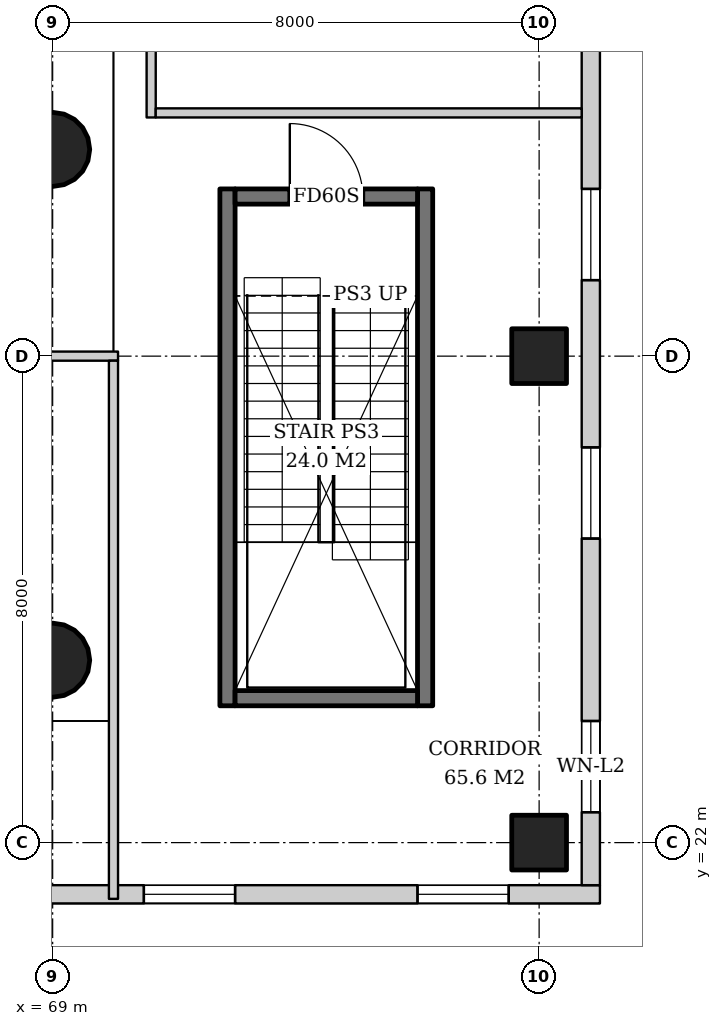
"""IFC4 building model, lengths in metres.
Left out: names, types, materials, properties, quantities, classifications, styles, units other than length and angle.
Written with IfcOpenShell. Run it as: python <this file> out.ifc"""

import sys

from ifc_helpers import new_model, si_unit, direction, frame, frame_2d, origin, origin_2d, place, context, subcontext, project, spatial, rectangle, hollow_circle, extrude, element, fill, save


model = new_model("IFC4")
c1 = context("Model", 3, precision=1e-05, world=origin(), true_north=direction((0.0, 1.0)))
c2 = subcontext(c1, "Body", "Model", "MODEL_VIEW")
j1 = project(units=[si_unit("LENGTHUNIT", "METRE"), si_unit("PLANEANGLEUNIT", "RADIAN")], contexts=[c1])
p1 = place(None, origin())
s1 = spatial("IfcSite", under=j1, at=p1, CompositionType="ELEMENT")
p2 = place(p1, origin())
s2 = spatial("IfcBuilding", under=s1, at=p2, CompositionType="ELEMENT")
p3 = place(p2, frame((0.0, 0.0, 16.0)))
s3 = spatial("IfcBuildingStorey", under=s2, at=p3, CompositionType="ELEMENT", Elevation=16.0)
for number, where, z_axis, x_axis in (
    (1, (77.0, 22.0, 0.0), (0.0, 0.0, 1.0), (1.0, 0.0, 0.0)),
    (2, (77.0, 30.0, 0.0), (0.0, 0.0, 1.0), (1.0, 0.0, 0.0)),
):
    element("IfcColumn", number, at=place(p3, frame(where, z_axis=z_axis, x_axis=x_axis)), inside=s3, PredefinedType="COLUMN", context=c2, shape_type="SweptSolid", body=[
        extrude(rectangle(XDim=0.9, YDim=0.9, at=origin_2d()), origin(), (0.0, 0.0, 1.0), 5.0),
    ])
for number, where, z_axis, x_axis in (
    (3, (69.0, 25.0, 0.0), (0.0, 0.0, 1.0), (1.0, 0.0, 0.0)),
    (4, (69.0, 33.4, 0.0), (0.0, 0.0, 1.0), (1.0, 0.0, 0.0)),
):
    element("IfcColumn", number, at=place(p3, frame(where, z_axis=z_axis, x_axis=x_axis)), inside=s3, PredefinedType="COLUMN", context=c2, shape_type="SweptSolid", body=[
        extrude(hollow_circle(Radius=0.61, WallThickness=0.04, at=origin_2d()), origin(), (0.0, 0.0, 1.0), 5.0),
    ])
p4 = place(p3, frame((20.0, 21.15, 0.0), z_axis=(0.0, 0.0, 1.0), x_axis=(1.0, 0.0, 0.0)))
e5 = element("IfcWall", 5, at=p4, inside=s3, PredefinedType="SOLIDWALL", context=c2, shape_type="SweptSolid", body=[
    extrude(rectangle(XDim=58.0, YDim=0.3, at=frame_2d((29.0, 0.0))), origin(), (0.0, 0.0, 1.0), 4.7),
])
p5 = place(p4, frame((1.5, 0.0, 0.9)))
e6 = element("IfcOpeningElement", 6, at=p5, cuts=e5, PredefinedType="OPENING", context=c2, shape_type="SweptSolid", body=[
    extrude(rectangle(XDim=1.5, YDim=3.2, at=frame_2d((0.75, 1.6))), frame((0.0, 0.16, 0.0), z_axis=(0.0, -1.0, 0.0), x_axis=(1.0, 0.0, 0.0)), (0.0, 0.0, 1.0), 0.32),
])
p6 = place(p4, frame((6.0, 0.0, 0.9)))
e7 = element("IfcOpeningElement", 7, at=p6, cuts=e5, PredefinedType="OPENING", context=c2, shape_type="SweptSolid", body=[
    extrude(rectangle(XDim=1.5, YDim=3.2, at=frame_2d((0.75, 1.6))), frame((0.0, 0.16, 0.0), z_axis=(0.0, -1.0, 0.0), x_axis=(1.0, 0.0, 0.0)), (0.0, 0.0, 1.0), 0.32),
])
p7 = place(p4, frame((10.25, 0.0, 0.9)))
e8 = element("IfcOpeningElement", 8, at=p7, cuts=e5, PredefinedType="OPENING", context=c2, shape_type="SweptSolid", body=[
    extrude(rectangle(XDim=1.5, YDim=3.2, at=frame_2d((0.75, 1.6))), frame((0.0, 0.16, 0.0), z_axis=(0.0, -1.0, 0.0), x_axis=(1.0, 0.0, 0.0)), (0.0, 0.0, 1.0), 0.32),
])
p8 = place(p4, frame((14.25, 0.0, 0.9)))
e9 = element("IfcOpeningElement", 9, at=p8, cuts=e5, PredefinedType="OPENING", context=c2, shape_type="SweptSolid", body=[
    extrude(rectangle(XDim=1.5, YDim=3.2, at=frame_2d((0.75, 1.6))), frame((0.0, 0.16, 0.0), z_axis=(0.0, -1.0, 0.0), x_axis=(1.0, 0.0, 0.0)), (0.0, 0.0, 1.0), 0.32),
])
p9 = place(p4, frame((18.25, 0.0, 0.9)))
e10 = element("IfcOpeningElement", 10, at=p9, cuts=e5, PredefinedType="OPENING", context=c2, shape_type="SweptSolid", body=[
    extrude(rectangle(XDim=1.5, YDim=3.2, at=frame_2d((0.75, 1.6))), frame((0.0, 0.16, 0.0), z_axis=(0.0, -1.0, 0.0), x_axis=(1.0, 0.0, 0.0)), (0.0, 0.0, 1.0), 0.32),
])
p10 = place(p4, frame((22.25, 0.0, 0.9)))
e11 = element("IfcOpeningElement", 11, at=p10, cuts=e5, PredefinedType="OPENING", context=c2, shape_type="SweptSolid", body=[
    extrude(rectangle(XDim=1.5, YDim=3.2, at=frame_2d((0.75, 1.6))), frame((0.0, 0.16, 0.0), z_axis=(0.0, -1.0, 0.0), x_axis=(1.0, 0.0, 0.0)), (0.0, 0.0, 1.0), 0.32),
])
p11 = place(p4, frame((26.25, 0.0, 0.9)))
e12 = element("IfcOpeningElement", 12, at=p11, cuts=e5, PredefinedType="OPENING", context=c2, shape_type="SweptSolid", body=[
    extrude(rectangle(XDim=1.5, YDim=3.2, at=frame_2d((0.75, 1.6))), frame((0.0, 0.16, 0.0), z_axis=(0.0, -1.0, 0.0), x_axis=(1.0, 0.0, 0.0)), (0.0, 0.0, 1.0), 0.32),
])
p12 = place(p4, frame((30.25, 0.0, 0.9)))
e13 = element("IfcOpeningElement", 13, at=p12, cuts=e5, PredefinedType="OPENING", context=c2, shape_type="SweptSolid", body=[
    extrude(rectangle(XDim=1.5, YDim=3.2, at=frame_2d((0.75, 1.6))), frame((0.0, 0.16, 0.0), z_axis=(0.0, -1.0, 0.0), x_axis=(1.0, 0.0, 0.0)), (0.0, 0.0, 1.0), 0.32),
])
p13 = place(p4, frame((34.25, 0.0, 0.9)))
e14 = element("IfcOpeningElement", 14, at=p13, cuts=e5, PredefinedType="OPENING", context=c2, shape_type="SweptSolid", body=[
    extrude(rectangle(XDim=1.5, YDim=3.2, at=frame_2d((0.75, 1.6))), frame((0.0, 0.16, 0.0), z_axis=(0.0, -1.0, 0.0), x_axis=(1.0, 0.0, 0.0)), (0.0, 0.0, 1.0), 0.32),
])
p14 = place(p4, frame((38.25, 0.0, 0.9)))
e15 = element("IfcOpeningElement", 15, at=p14, cuts=e5, PredefinedType="OPENING", context=c2, shape_type="SweptSolid", body=[
    extrude(rectangle(XDim=1.5, YDim=3.2, at=frame_2d((0.75, 1.6))), frame((0.0, 0.16, 0.0), z_axis=(0.0, -1.0, 0.0), x_axis=(1.0, 0.0, 0.0)), (0.0, 0.0, 1.0), 0.32),
])
p15 = place(p4, frame((42.25, 0.0, 0.9)))
e16 = element("IfcOpeningElement", 16, at=p15, cuts=e5, PredefinedType="OPENING", context=c2, shape_type="SweptSolid", body=[
    extrude(rectangle(XDim=1.5, YDim=3.2, at=frame_2d((0.75, 1.6))), frame((0.0, 0.16, 0.0), z_axis=(0.0, -1.0, 0.0), x_axis=(1.0, 0.0, 0.0)), (0.0, 0.0, 1.0), 0.32),
])
p16 = place(p4, frame((46.25, 0.0, 0.9)))
e17 = element("IfcOpeningElement", 17, at=p16, cuts=e5, PredefinedType="OPENING", context=c2, shape_type="SweptSolid", body=[
    extrude(rectangle(XDim=1.5, YDim=3.2, at=frame_2d((0.75, 1.6))), frame((0.0, 0.16, 0.0), z_axis=(0.0, -1.0, 0.0), x_axis=(1.0, 0.0, 0.0)), (0.0, 0.0, 1.0), 0.32),
])
p17 = place(p4, frame((50.5, 0.0, 0.9)))
e18 = element("IfcOpeningElement", 18, at=p17, cuts=e5, PredefinedType="OPENING", context=c2, shape_type="SweptSolid", body=[
    extrude(rectangle(XDim=1.5, YDim=3.2, at=frame_2d((0.75, 1.6))), frame((0.0, 0.16, 0.0), z_axis=(0.0, -1.0, 0.0), x_axis=(1.0, 0.0, 0.0)), (0.0, 0.0, 1.0), 0.32),
])
p18 = place(p4, frame((55.0, 0.0, 0.9)))
e19 = element("IfcOpeningElement", 19, at=p18, cuts=e5, PredefinedType="OPENING", context=c2, shape_type="SweptSolid", body=[
    extrude(rectangle(XDim=1.5, YDim=3.2, at=frame_2d((0.75, 1.6))), frame((0.0, 0.16, 0.0), z_axis=(0.0, -1.0, 0.0), x_axis=(1.0, 0.0, 0.0)), (0.0, 0.0, 1.0), 0.32),
])
p19 = place(p3, frame((77.85, 21.3, 0.0), z_axis=(0.0, 0.0, 1.0), x_axis=(0.0, 1.0, 0.0)))
e20 = element("IfcWall", 20, at=p19, inside=s3, PredefinedType="SOLIDWALL", context=c2, shape_type="SweptSolid", body=[
    extrude(rectangle(XDim=49.4, YDim=0.3, at=frame_2d((24.7, 0.0))), origin(), (0.0, 0.0, 1.0), 4.7),
])
p20 = place(p19, frame((1.2, 0.0, 0.9)))
e21 = element("IfcOpeningElement", 21, at=p20, cuts=e20, PredefinedType="OPENING", context=c2, shape_type="SweptSolid", body=[
    extrude(rectangle(XDim=1.5, YDim=3.2, at=frame_2d((0.75, 1.6))), frame((0.0, 0.16, 0.0), z_axis=(0.0, -1.0, 0.0), x_axis=(1.0, 0.0, 0.0)), (0.0, 0.0, 1.0), 0.32),
])
p21 = place(p19, frame((5.7, 0.0, 0.9)))
e22 = element("IfcOpeningElement", 22, at=p21, cuts=e20, PredefinedType="OPENING", context=c2, shape_type="SweptSolid", body=[
    extrude(rectangle(XDim=1.5, YDim=3.2, at=frame_2d((0.75, 1.6))), frame((0.0, 0.16, 0.0), z_axis=(0.0, -1.0, 0.0), x_axis=(1.0, 0.0, 0.0)), (0.0, 0.0, 1.0), 0.32),
])
p22 = place(p19, frame((9.95, 0.0, 0.9)))
e23 = element("IfcOpeningElement", 23, at=p22, cuts=e20, PredefinedType="OPENING", context=c2, shape_type="SweptSolid", body=[
    extrude(rectangle(XDim=1.5, YDim=3.2, at=frame_2d((0.75, 1.6))), frame((0.0, 0.16, 0.0), z_axis=(0.0, -1.0, 0.0), x_axis=(1.0, 0.0, 0.0)), (0.0, 0.0, 1.0), 0.32),
])
p23 = place(p19, frame((13.95, 0.0, 0.9)))
e24 = element("IfcOpeningElement", 24, at=p23, cuts=e20, PredefinedType="OPENING", context=c2, shape_type="SweptSolid", body=[
    extrude(rectangle(XDim=1.5, YDim=3.2, at=frame_2d((0.75, 1.6))), frame((0.0, 0.16, 0.0), z_axis=(0.0, -1.0, 0.0), x_axis=(1.0, 0.0, 0.0)), (0.0, 0.0, 1.0), 0.32),
])
p24 = place(p19, frame((17.95, 0.0, 0.9)))
e25 = element("IfcOpeningElement", 25, at=p24, cuts=e20, PredefinedType="OPENING", context=c2, shape_type="SweptSolid", body=[
    extrude(rectangle(XDim=1.5, YDim=3.2, at=frame_2d((0.75, 1.6))), frame((0.0, 0.16, 0.0), z_axis=(0.0, -1.0, 0.0), x_axis=(1.0, 0.0, 0.0)), (0.0, 0.0, 1.0), 0.32),
])
p25 = place(p19, frame((21.95, 0.0, 0.9)))
e26 = element("IfcOpeningElement", 26, at=p25, cuts=e20, PredefinedType="OPENING", context=c2, shape_type="SweptSolid", body=[
    extrude(rectangle(XDim=1.5, YDim=3.2, at=frame_2d((0.75, 1.6))), frame((0.0, 0.16, 0.0), z_axis=(0.0, -1.0, 0.0), x_axis=(1.0, 0.0, 0.0)), (0.0, 0.0, 1.0), 0.32),
])
p26 = place(p19, frame((25.95, 0.0, 0.9)))
e27 = element("IfcOpeningElement", 27, at=p26, cuts=e20, PredefinedType="OPENING", context=c2, shape_type="SweptSolid", body=[
    extrude(rectangle(XDim=1.5, YDim=3.2, at=frame_2d((0.75, 1.6))), frame((0.0, 0.16, 0.0), z_axis=(0.0, -1.0, 0.0), x_axis=(1.0, 0.0, 0.0)), (0.0, 0.0, 1.0), 0.32),
])
p27 = place(p19, frame((29.95, 0.0, 0.9)))
e28 = element("IfcOpeningElement", 28, at=p27, cuts=e20, PredefinedType="OPENING", context=c2, shape_type="SweptSolid", body=[
    extrude(rectangle(XDim=1.5, YDim=3.2, at=frame_2d((0.75, 1.6))), frame((0.0, 0.16, 0.0), z_axis=(0.0, -1.0, 0.0), x_axis=(1.0, 0.0, 0.0)), (0.0, 0.0, 1.0), 0.32),
])
p28 = place(p19, frame((33.95, 0.0, 0.9)))
e29 = element("IfcOpeningElement", 29, at=p28, cuts=e20, PredefinedType="OPENING", context=c2, shape_type="SweptSolid", body=[
    extrude(rectangle(XDim=1.5, YDim=3.2, at=frame_2d((0.75, 1.6))), frame((0.0, 0.16, 0.0), z_axis=(0.0, -1.0, 0.0), x_axis=(1.0, 0.0, 0.0)), (0.0, 0.0, 1.0), 0.32),
])
p29 = place(p19, frame((37.95, 0.0, 0.9)))
e30 = element("IfcOpeningElement", 30, at=p29, cuts=e20, PredefinedType="OPENING", context=c2, shape_type="SweptSolid", body=[
    extrude(rectangle(XDim=1.5, YDim=3.2, at=frame_2d((0.75, 1.6))), frame((0.0, 0.16, 0.0), z_axis=(0.0, -1.0, 0.0), x_axis=(1.0, 0.0, 0.0)), (0.0, 0.0, 1.0), 0.32),
])
p30 = place(p19, frame((42.2, 0.0, 0.9)))
e31 = element("IfcOpeningElement", 31, at=p30, cuts=e20, PredefinedType="OPENING", context=c2, shape_type="SweptSolid", body=[
    extrude(rectangle(XDim=1.5, YDim=3.2, at=frame_2d((0.75, 1.6))), frame((0.0, 0.16, 0.0), z_axis=(0.0, -1.0, 0.0), x_axis=(1.0, 0.0, 0.0)), (0.0, 0.0, 1.0), 0.32),
])
p31 = place(p19, frame((46.7, 0.0, 0.9)))
e32 = element("IfcOpeningElement", 32, at=p31, cuts=e20, PredefinedType="OPENING", context=c2, shape_type="SweptSolid", body=[
    extrude(rectangle(XDim=1.5, YDim=3.2, at=frame_2d((0.75, 1.6))), frame((0.0, 0.16, 0.0), z_axis=(0.0, -1.0, 0.0), x_axis=(1.0, 0.0, 0.0)), (0.0, 0.0, 1.0), 0.32),
])
for number, where, z_axis, x_axis in (
    (33, (71.875, 24.25, 0.0), (0.0, 0.0, 1.0), (0.0, 1.0, 0.0)),
    (34, (75.125, 24.25, 0.0), (0.0, 0.0, 1.0), (0.0, 1.0, 0.0)),
):
    element("IfcWall", number, at=place(p3, frame(where, z_axis=z_axis, x_axis=x_axis)), inside=s3, PredefinedType="SOLIDWALL", context=c2, shape_type="SweptSolid", body=[
        extrude(rectangle(XDim=8.5, YDim=0.25, at=frame_2d((4.25, 0.0))), origin(), (0.0, 0.0, 1.0), 4.7),
    ])
p32 = place(p3, frame((72.0, 24.375, 0.0), z_axis=(0.0, 0.0, 1.0), x_axis=(1.0, 0.0, 0.0)))
e35 = element("IfcWall", 35, at=p32, inside=s3, PredefinedType="SOLIDWALL", context=c2, shape_type="SweptSolid", body=[
    extrude(rectangle(XDim=3.0, YDim=0.25, at=frame_2d((1.5, 0.0))), origin(), (0.0, 0.0, 1.0), 4.7),
])
p33 = place(p3, frame((72.0, 32.625, 0.0), z_axis=(0.0, 0.0, 1.0), x_axis=(1.0, 0.0, 0.0)))
e36 = element("IfcWall", 36, at=p33, inside=s3, PredefinedType="SOLIDWALL", context=c2, shape_type="SweptSolid", body=[
    extrude(rectangle(XDim=3.0, YDim=0.25, at=frame_2d((1.5, 0.0))), origin(), (0.0, 0.0, 1.0), 4.7),
])
p34 = place(p33, frame((0.9, 0.0, 0.0)))
e37 = element("IfcOpeningElement", 37, at=p34, cuts=e36, PredefinedType="OPENING", context=c2, shape_type="SweptSolid", body=[
    extrude(rectangle(XDim=1.2, YDim=2.1, at=frame_2d((0.6, 1.05))), frame((0.0, 0.135, 0.0), z_axis=(0.0, -1.0, 0.0), x_axis=(1.0, 0.0, 0.0)), (0.0, 0.0, 1.0), 0.27),
])
p35 = place(p3, frame((70.62, 33.925, 0.0), z_axis=(0.0, 0.0, 1.0), x_axis=(0.0, 1.0, 0.0)))
e38 = element("IfcWall", 38, at=p35, inside=s3, PredefinedType="PARTITIONING", context=c2, shape_type="SweptSolid", body=[
    extrude(rectangle(XDim=24.15, YDim=0.15, at=frame_2d((12.075, 0.0))), origin(), (0.0, 0.0, 1.0), 4.7),
])
p36 = place(p35, frame((11.325, 0.0, 0.0)))
e39 = element("IfcOpeningElement", 39, at=p36, cuts=e38, PredefinedType="OPENING", context=c2, shape_type="SweptSolid", body=[
    extrude(rectangle(XDim=1.5, YDim=2.1, at=frame_2d((0.75, 1.05))), frame((0.0, 0.085, 0.0), z_axis=(0.0, -1.0, 0.0), x_axis=(1.0, 0.0, 0.0)), (0.0, 0.0, 1.0), 0.17),
])
p37 = place(p3, frame((70.695, 34.0, 0.0), z_axis=(0.0, 0.0, 1.0), x_axis=(1.0, 0.0, 0.0)))
e40 = element("IfcWall", 40, at=p37, inside=s3, PredefinedType="PARTITIONING", context=c2, shape_type="SweptSolid", body=[
    extrude(rectangle(XDim=7.005, YDim=0.15, at=frame_2d((3.502, 0.0))), origin(), (0.0, 0.0, 1.0), 4.7),
])
p38 = place(p3, frame((19.925, 30.0, 0.0), z_axis=(0.0, 0.0, 1.0), x_axis=(1.0, 0.0, 0.0)))
e41 = element("IfcWall", 41, at=p38, inside=s3, PredefinedType="PARTITIONING", context=c2, shape_type="SweptSolid", body=[
    extrude(rectangle(XDim=50.15, YDim=0.15, at=frame_2d((25.075, 0.0))), origin(), (0.0, 0.0, 1.0), 3.688),
])
p39 = place(p38, frame((7.625, 0.0, 0.0)))
e42 = element("IfcOpeningElement", 42, at=p39, cuts=e41, PredefinedType="OPENING", context=c2, shape_type="SweptSolid", body=[
    extrude(rectangle(XDim=1.5, YDim=2.1, at=frame_2d((0.75, 1.05))), frame((0.0, 0.085, 0.0), z_axis=(0.0, -1.0, 0.0), x_axis=(1.0, 0.0, 0.0)), (0.0, 0.0, 1.0), 0.17),
])
p40 = place(p38, frame((20.375, 0.0, 0.0)))
e43 = element("IfcOpeningElement", 43, at=p40, cuts=e41, PredefinedType="OPENING", context=c2, shape_type="SweptSolid", body=[
    extrude(rectangle(XDim=1.0, YDim=2.1, at=frame_2d((0.5, 1.05))), frame((0.0, 0.085, 0.0), z_axis=(0.0, -1.0, 0.0), x_axis=(1.0, 0.0, 0.0)), (0.0, 0.0, 1.0), 0.17),
])
p41 = place(p38, frame((28.775, 0.0, 0.0)))
e44 = element("IfcOpeningElement", 44, at=p41, cuts=e41, PredefinedType="OPENING", context=c2, shape_type="SweptSolid", body=[
    extrude(rectangle(XDim=1.0, YDim=2.1, at=frame_2d((0.5, 1.05))), frame((0.0, 0.085, 0.0), z_axis=(0.0, -1.0, 0.0), x_axis=(1.0, 0.0, 0.0)), (0.0, 0.0, 1.0), 0.17),
])
p42 = place(p38, frame((39.875, 0.0, 0.0)))
e45 = element("IfcOpeningElement", 45, at=p42, cuts=e41, PredefinedType="OPENING", context=c2, shape_type="SweptSolid", body=[
    extrude(rectangle(XDim=1.0, YDim=2.1, at=frame_2d((0.5, 1.05))), frame((0.0, 0.085, 0.0), z_axis=(0.0, -1.0, 0.0), x_axis=(1.0, 0.0, 0.0)), (0.0, 0.0, 1.0), 0.17),
])
p43 = place(p3, frame((70.0, 21.075, 0.0), z_axis=(0.0, 0.0, 1.0), x_axis=(0.0, 1.0, 0.0)))
e46 = element("IfcWall", 46, at=p43, inside=s3, PredefinedType="PARTITIONING", context=c2, shape_type="SweptSolid", body=[
    extrude(rectangle(XDim=8.85, YDim=0.15, at=frame_2d((4.425, 0.0))), origin(), (0.0, 0.0, 1.0), 4.7),
])
p44 = place(p17, origin())
e47 = element("IfcWindow", 47, at=p44, inside=s3, PartitioningType="SINGLE_PANEL", PredefinedType="WINDOW", context=c2, shape_type="SweptSolid", body=[
    extrude(rectangle(XDim=1.5, YDim=3.2, at=frame_2d((0.75, 1.6))), frame((0.0, 0.03, 0.0), z_axis=(0.0, -1.0, 0.0), x_axis=(1.0, 0.0, 0.0)), (0.0, 0.0, 1.0), 0.06),
])
fill(e18, e47)
p45 = place(p18, origin())
e48 = element("IfcWindow", 48, at=p45, inside=s3, PartitioningType="SINGLE_PANEL", PredefinedType="WINDOW", context=c2, shape_type="SweptSolid", body=[
    extrude(rectangle(XDim=1.5, YDim=3.2, at=frame_2d((0.75, 1.6))), frame((0.0, 0.03, 0.0), z_axis=(0.0, -1.0, 0.0), x_axis=(1.0, 0.0, 0.0)), (0.0, 0.0, 1.0), 0.06),
])
fill(e19, e48)
p46 = place(p20, origin())
e49 = element("IfcWindow", 49, at=p46, inside=s3, PartitioningType="SINGLE_PANEL", PredefinedType="WINDOW", context=c2, shape_type="SweptSolid", body=[
    extrude(rectangle(XDim=1.5, YDim=3.2, at=frame_2d((0.75, 1.6))), frame((0.0, 0.03, 0.0), z_axis=(0.0, -1.0, 0.0), x_axis=(1.0, 0.0, 0.0)), (0.0, 0.0, 1.0), 0.06),
])
fill(e21, e49)
p47 = place(p21, origin())
e50 = element("IfcWindow", 50, at=p47, inside=s3, PartitioningType="SINGLE_PANEL", PredefinedType="WINDOW", context=c2, shape_type="SweptSolid", body=[
    extrude(rectangle(XDim=1.5, YDim=3.2, at=frame_2d((0.75, 1.6))), frame((0.0, 0.03, 0.0), z_axis=(0.0, -1.0, 0.0), x_axis=(1.0, 0.0, 0.0)), (0.0, 0.0, 1.0), 0.06),
])
fill(e22, e50)
p48 = place(p22, origin())
e51 = element("IfcWindow", 51, at=p48, inside=s3, PartitioningType="SINGLE_PANEL", PredefinedType="WINDOW", context=c2, shape_type="SweptSolid", body=[
    extrude(rectangle(XDim=1.5, YDim=3.2, at=frame_2d((0.75, 1.6))), frame((0.0, 0.03, 0.0), z_axis=(0.0, -1.0, 0.0), x_axis=(1.0, 0.0, 0.0)), (0.0, 0.0, 1.0), 0.06),
])
fill(e23, e51)
p49 = place(p34, origin())
e52 = element("IfcDoor", 52, at=p49, inside=s3, OperationType="SINGLE_SWING_LEFT", PredefinedType="DOOR", context=c2, shape_type="SweptSolid", body=[
    extrude(rectangle(XDim=1.2, YDim=2.1, at=frame_2d((0.6, 1.05))), frame((0.0, 0.025, 0.0), z_axis=(0.0, -1.0, 0.0), x_axis=(1.0, 0.0, 0.0)), (0.0, 0.0, 1.0), 0.05),
])
fill(e37, e52)
save(model, sys.argv[1])
